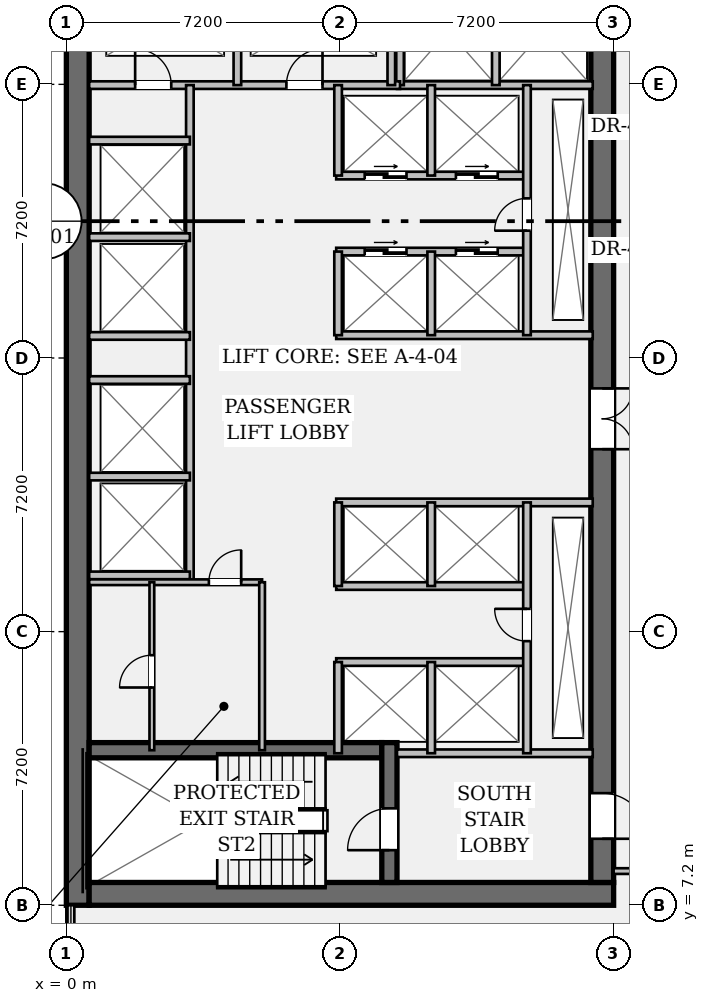
"""IFC4 building model, lengths in metres.
Left out: names, types, materials, properties, quantities, classifications, styles, units other than length and angle.
Written with IfcOpenShell. Run it as: python <this file> out.ifc"""

import sys

from ifc_helpers import new_model, si_unit, direction, frame, frame_2d, origin, place, context, subcontext, project, spatial, rectangle, extrude, element, fill, save


model = new_model("IFC4")
c1 = context("Model", 3, precision=1e-05, world=origin(), true_north=direction((0.0, 1.0)))
c2 = subcontext(c1, "Body", "Model", "MODEL_VIEW")
j1 = project(units=[si_unit("LENGTHUNIT", "METRE"), si_unit("PLANEANGLEUNIT", "RADIAN")], contexts=[c1])
p1 = place(None, origin())
s1 = spatial("IfcSite", under=j1, at=p1, CompositionType="ELEMENT")
p2 = place(p1, origin())
s2 = spatial("IfcBuilding", under=s1, at=p2, CompositionType="ELEMENT")
p3 = place(p2, frame((0.0, 0.0, 35.0)))
s3 = spatial("IfcBuildingStorey", under=s2, at=p3, CompositionType="ELEMENT", Elevation=35.0)
p4 = place(p3, frame((0.3, 7.2, 0.0), z_axis=(0.0, 0.0, 1.0), x_axis=(0.0, 1.0, 0.0)))
e1 = element("IfcWall", 1, at=p4, inside=s3, PredefinedType="SHEAR", context=c2, shape_type="SweptSolid", body=[
    extrude(rectangle(XDim=28.8, YDim=0.6, at=frame_2d((14.4, 0.0))), origin(), (0.0, 0.0, 1.0), 3.57),
])
p5 = place(p3, frame((0.6, 7.5, 0.0), z_axis=(0.0, 0.0, 1.0), x_axis=(1.0, 0.0, 0.0)))
e2 = element("IfcWall", 2, at=p5, inside=s3, PredefinedType="SHEAR", context=c2, shape_type="SweptSolid", body=[
    extrude(rectangle(XDim=13.8, YDim=0.6, at=frame_2d((6.9, 0.0))), origin(), (0.0, 0.0, 1.0), 3.57),
])
p6 = place(p3, frame((14.1, 35.4, 0.0), z_axis=(0.0, 0.0, 1.0), x_axis=(0.0, -1.0, 0.0)))
e3 = element("IfcWall", 3, at=p6, inside=s3, PredefinedType="SHEAR", context=c2, shape_type="SweptSolid", body=[
    extrude(rectangle(XDim=27.6, YDim=0.6, at=frame_2d((13.8, 0.0))), origin(), (0.0, 0.0, 1.0), 3.57),
])
p7 = place(p6, frame((1.3, 0.0, 0.0)))
e4 = element("IfcOpeningElement", 4, at=p7, cuts=e3, PredefinedType="OPENING", context=c2, shape_type="SweptSolid", body=[
    extrude(rectangle(XDim=1.2, YDim=2.15, at=frame_2d((0.6, 1.075))), frame((0.0, 0.312, 0.0), z_axis=(0.0, -1.0, 0.0), x_axis=(1.0, 0.0, 0.0)), (0.0, 0.0, 1.0), 0.624),
])
p8 = place(p6, frame((25.25, 0.0, 0.0)))
e5 = element("IfcOpeningElement", 5, at=p8, cuts=e3, PredefinedType="OPENING", context=c2, shape_type="SweptSolid", body=[
    extrude(rectangle(XDim=1.2, YDim=2.15, at=frame_2d((0.6, 1.075))), frame((0.0, 0.312, 0.0), z_axis=(0.0, -1.0, 0.0), x_axis=(1.0, 0.0, 0.0)), (0.0, 0.0, 1.0), 0.624),
])
p9 = place(p6, frame((14.6, 0.0, 0.0)))
e6 = element("IfcOpeningElement", 6, at=p9, cuts=e3, PredefinedType="OPENING", context=c2, shape_type="SweptSolid", body=[
    extrude(rectangle(XDim=1.6, YDim=2.2, at=frame_2d((0.8, 1.1))), frame((0.0, 0.312, 0.0), z_axis=(0.0, -1.0, 0.0), x_axis=(1.0, 0.0, 0.0)), (0.0, 0.0, 1.0), 0.624),
])
p10 = place(p3, frame((0.6, 11.28, 0.0), z_axis=(0.0, 0.0, 1.0), x_axis=(1.0, 0.0, 0.0)))
e7 = element("IfcWall", 7, at=p10, inside=s3, PredefinedType="SHEAR", context=c2, shape_type="SweptSolid", body=[
    extrude(rectangle(XDim=7.7, YDim=0.4, at=frame_2d((3.85, 0.0))), origin(), (0.0, 0.0, 1.0), 3.57),
])
p11 = place(p3, frame((8.5, 7.8, 0.0), z_axis=(0.0, 0.0, 1.0), x_axis=(0.0, 1.0, 0.0)))
e8 = element("IfcWall", 8, at=p11, inside=s3, PredefinedType="SHEAR", context=c2, shape_type="SweptSolid", body=[
    extrude(rectangle(XDim=3.68, YDim=0.4, at=frame_2d((1.84, 0.0))), origin(), (0.0, 0.0, 1.0), 3.57),
])
p12 = place(p11, frame((0.85, 0.0, 0.0)))
e9 = element("IfcOpeningElement", 9, at=p12, cuts=e8, PredefinedType="OPENING", context=c2, shape_type="SweptSolid", body=[
    extrude(rectangle(XDim=1.1, YDim=2.15, at=frame_2d((0.55, 1.075))), frame((0.0, 0.212, 0.0), z_axis=(0.0, -1.0, 0.0), x_axis=(1.0, 0.0, 0.0)), (0.0, 0.0, 1.0), 0.424),
])
for number, where, z_axis, x_axis in (
    (10, (8.7, 11.2, 0.0), (0.0, 0.0, 1.0), (1.0, 0.0, 0.0)),
    (11, (8.7, 28.78, 0.0), (0.0, 0.0, 1.0), (1.0, 0.0, 0.0)),
):
    element("IfcWall", number, at=place(p3, frame(where, z_axis=z_axis, x_axis=x_axis)), inside=s3, PredefinedType="PARTITIONING", context=c2, shape_type="SweptSolid", body=[
        extrude(rectangle(XDim=5.15, YDim=0.2, at=frame_2d((2.575, 0.0))), origin(), (0.0, 0.0, 1.0), 3.57),
    ])
for number, where, z_axis, x_axis in (
    (12, (8.78, 28.78, 0.0), (0.0, 0.0, 1.0), (0.0, 1.0, 0.0)),
    (13, (11.3, 28.78, 0.0), (0.0, 0.0, 1.0), (0.0, 1.0, 0.0)),
):
    element("IfcWall", number, at=place(p3, frame(where, z_axis=z_axis, x_axis=x_axis)), inside=s3, PredefinedType="PARTITIONING", context=c2, shape_type="SweptSolid", body=[
        extrude(rectangle(XDim=3.1, YDim=0.2, at=frame_2d((1.55, 0.0))), origin(), (0.0, 0.0, 1.0), 3.57),
    ])
p13 = place(p3, frame((0.6, 28.78, 0.0), z_axis=(0.0, 0.0, 1.0), x_axis=(1.0, 0.0, 0.0)))
e14 = element("IfcWall", 14, at=p13, inside=s3, PredefinedType="PARTITIONING", context=c2, shape_type="SweptSolid", body=[
    extrude(rectangle(XDim=8.18, YDim=0.2, at=frame_2d((4.09, 0.0))), origin(), (0.0, 0.0, 1.0), 3.57),
])
p14 = place(p13, frame((1.21, 0.0, 0.0)))
e15 = element("IfcOpeningElement", 15, at=p14, cuts=e14, PredefinedType="OPENING", context=c2, shape_type="SweptSolid", body=[
    extrude(rectangle(XDim=0.95, YDim=2.15, at=frame_2d((0.475, 1.075))), frame((0.0, 0.112, 0.0), z_axis=(0.0, -1.0, 0.0), x_axis=(1.0, 0.0, 0.0)), (0.0, 0.0, 1.0), 0.224),
])
p15 = place(p13, frame((5.19, 0.0, 0.0)))
e16 = element("IfcOpeningElement", 16, at=p15, cuts=e14, PredefinedType="OPENING", context=c2, shape_type="SweptSolid", body=[
    extrude(rectangle(XDim=0.95, YDim=2.15, at=frame_2d((0.475, 1.075))), frame((0.0, 0.112, 0.0), z_axis=(0.0, -1.0, 0.0), x_axis=(1.0, 0.0, 0.0)), (0.0, 0.0, 1.0), 0.224),
])
for number, where, z_axis, x_axis in (
    (17, (4.5, 28.78, 0.0), (0.0, 0.0, 1.0), (0.0, 1.0, 0.0)),
    (18, (8.55, 28.78, 0.0), (0.0, 0.0, 1.0), (0.0, 1.0, 0.0)),
):
    element("IfcWall", number, at=place(p3, frame(where, z_axis=z_axis, x_axis=x_axis)), inside=s3, PredefinedType="PARTITIONING", context=c2, shape_type="SweptSolid", body=[
        extrude(rectangle(XDim=2.94, YDim=0.2, at=frame_2d((1.47, 0.0))), origin(), (0.0, 0.0, 1.0), 3.57),
    ])
p16 = place(p3, frame((3.25, 15.7, 0.0), z_axis=(0.0, 0.0, 1.0), x_axis=(0.0, 1.0, 0.0)))
e19 = element("IfcWall", 19, at=p16, inside=s3, PredefinedType="PARTITIONING", context=c2, shape_type="SweptSolid", body=[
    extrude(rectangle(XDim=13.08, YDim=0.2, at=frame_2d((6.54, 0.0))), origin(), (0.0, 0.0, 1.0), 3.57),
])
for number, where, z_axis, x_axis in (
    (20, (0.6, 15.88, 0.0), (0.0, 0.0, 1.0), (1.0, 0.0, 0.0)),
    (21, (0.6, 18.48, 0.0), (0.0, 0.0, 1.0), (1.0, 0.0, 0.0)),
    (22, (0.6, 22.18, 0.0), (0.0, 0.0, 1.0), (1.0, 0.0, 0.0)),
    (23, (0.6, 24.78, 0.0), (0.0, 0.0, 1.0), (1.0, 0.0, 0.0)),
    (24, (0.6, 21.02, 0.0), (0.0, 0.0, 1.0), (1.0, 0.0, 0.0)),
    (25, (0.6, 27.32, 0.0), (0.0, 0.0, 1.0), (1.0, 0.0, 0.0)),
):
    element("IfcWall", number, at=place(p3, frame(where, z_axis=z_axis, x_axis=x_axis)), inside=s3, PredefinedType="PARTITIONING", context=c2, shape_type="SweptSolid", body=[
        extrude(rectangle(XDim=2.65, YDim=0.2, at=frame_2d((1.325, 0.0))), origin(), (0.0, 0.0, 1.0), 3.57),
    ])
p17 = place(p3, frame((7.1, 22.2, 0.0), z_axis=(0.0, 0.0, 1.0), x_axis=(1.0, 0.0, 0.0)))
e26 = element("IfcWall", 26, at=p17, inside=s3, PredefinedType="PARTITIONING", context=c2, shape_type="SweptSolid", body=[
    extrude(rectangle(XDim=6.75, YDim=0.2, at=frame_2d((3.375, 0.0))), origin(), (0.0, 0.0, 1.0), 3.57),
])
p18 = place(p3, frame((7.1, 24.4, 0.0), z_axis=(0.0, 0.0, 1.0), x_axis=(1.0, 0.0, 0.0)))
e27 = element("IfcWall", 27, at=p18, inside=s3, PredefinedType="PARTITIONING", context=c2, shape_type="SweptSolid", body=[
    extrude(rectangle(XDim=5.02, YDim=0.2, at=frame_2d((2.51, 0.0))), origin(), (0.0, 0.0, 1.0), 3.57),
])
p19 = place(p18, frame((0.75, 0.0, 0.0)))
e28 = element("IfcOpeningElement", 28, at=p19, cuts=e27, PredefinedType="OPENING", context=c2, shape_type="SweptSolid", body=[
    extrude(rectangle(XDim=1.1, YDim=2.2, at=frame_2d((0.55, 1.1))), frame((0.0, 0.112, 0.0), z_axis=(0.0, -1.0, 0.0), x_axis=(1.0, 0.0, 0.0)), (0.0, 0.0, 1.0), 0.224),
])
p20 = place(p18, frame((3.15, 0.0, 0.0)))
e29 = element("IfcOpeningElement", 29, at=p20, cuts=e27, PredefinedType="OPENING", context=c2, shape_type="SweptSolid", body=[
    extrude(rectangle(XDim=1.1, YDim=2.2, at=frame_2d((0.55, 1.1))), frame((0.0, 0.112, 0.0), z_axis=(0.0, -1.0, 0.0), x_axis=(1.0, 0.0, 0.0)), (0.0, 0.0, 1.0), 0.224),
])
p21 = place(p3, frame((7.1, 26.4, 0.0), z_axis=(0.0, 0.0, 1.0), x_axis=(1.0, 0.0, 0.0)))
e30 = element("IfcWall", 30, at=p21, inside=s3, PredefinedType="PARTITIONING", context=c2, shape_type="SweptSolid", body=[
    extrude(rectangle(XDim=5.02, YDim=0.2, at=frame_2d((2.51, 0.0))), origin(), (0.0, 0.0, 1.0), 3.57),
])
p22 = place(p21, frame((0.75, 0.0, 0.0)))
e31 = element("IfcOpeningElement", 31, at=p22, cuts=e30, PredefinedType="OPENING", context=c2, shape_type="SweptSolid", body=[
    extrude(rectangle(XDim=1.1, YDim=2.2, at=frame_2d((0.55, 1.1))), frame((0.0, 0.112, 0.0), z_axis=(0.0, -1.0, 0.0), x_axis=(1.0, 0.0, 0.0)), (0.0, 0.0, 1.0), 0.224),
])
p23 = place(p21, frame((3.15, 0.0, 0.0)))
e32 = element("IfcOpeningElement", 32, at=p23, cuts=e30, PredefinedType="OPENING", context=c2, shape_type="SweptSolid", body=[
    extrude(rectangle(XDim=1.1, YDim=2.2, at=frame_2d((0.55, 1.1))), frame((0.0, 0.112, 0.0), z_axis=(0.0, -1.0, 0.0), x_axis=(1.0, 0.0, 0.0)), (0.0, 0.0, 1.0), 0.224),
])
p24 = place(p3, frame((7.15, 22.2, 0.0), z_axis=(0.0, 0.0, 1.0), x_axis=(0.0, 1.0, 0.0)))
e33 = element("IfcWall", 33, at=p24, inside=s3, PredefinedType="PARTITIONING", context=c2, shape_type="SweptSolid", body=[
    extrude(rectangle(XDim=2.2, YDim=0.2, at=frame_2d((1.1, 0.0))), origin(), (0.0, 0.0, 1.0), 3.57),
])
p25 = place(p3, frame((7.15, 26.4, 0.0), z_axis=(0.0, 0.0, 1.0), x_axis=(0.0, 1.0, 0.0)))
e34 = element("IfcWall", 34, at=p25, inside=s3, PredefinedType="PARTITIONING", context=c2, shape_type="SweptSolid", body=[
    extrude(rectangle(XDim=2.38, YDim=0.2, at=frame_2d((1.19, 0.0))), origin(), (0.0, 0.0, 1.0), 3.57),
])
p26 = place(p3, frame((9.6, 22.2, 0.0), z_axis=(0.0, 0.0, 1.0), x_axis=(0.0, 1.0, 0.0)))
e35 = element("IfcWall", 35, at=p26, inside=s3, PredefinedType="PARTITIONING", context=c2, shape_type="SweptSolid", body=[
    extrude(rectangle(XDim=2.2, YDim=0.2, at=frame_2d((1.1, 0.0))), origin(), (0.0, 0.0, 1.0), 3.57),
])
p27 = place(p3, frame((9.6, 26.4, 0.0), z_axis=(0.0, 0.0, 1.0), x_axis=(0.0, 1.0, 0.0)))
e36 = element("IfcWall", 36, at=p27, inside=s3, PredefinedType="PARTITIONING", context=c2, shape_type="SweptSolid", body=[
    extrude(rectangle(XDim=2.38, YDim=0.2, at=frame_2d((1.19, 0.0))), origin(), (0.0, 0.0, 1.0), 3.57),
])
p28 = place(p3, frame((12.12, 22.2, 0.0), z_axis=(0.0, 0.0, 1.0), x_axis=(0.0, 1.0, 0.0)))
e37 = element("IfcWall", 37, at=p28, inside=s3, PredefinedType="PARTITIONING", context=c2, shape_type="SweptSolid", body=[
    extrude(rectangle(XDim=6.58, YDim=0.2, at=frame_2d((3.29, 0.0))), origin(), (0.0, 0.0, 1.0), 3.57),
])
p29 = place(p28, frame((2.75, 0.0, 0.0)))
e38 = element("IfcOpeningElement", 38, at=p29, cuts=e37, PredefinedType="OPENING", context=c2, shape_type="SweptSolid", body=[
    extrude(rectangle(XDim=0.85, YDim=2.15, at=frame_2d((0.425, 1.075))), frame((0.0, 0.112, 0.0), z_axis=(0.0, -1.0, 0.0), x_axis=(1.0, 0.0, 0.0)), (0.0, 0.0, 1.0), 0.224),
])
p30 = place(p3, frame((7.1, 17.8, 0.0), z_axis=(0.0, 0.0, 1.0), x_axis=(1.0, 0.0, 0.0)))
e39 = element("IfcWall", 39, at=p30, inside=s3, PredefinedType="PARTITIONING", context=c2, shape_type="SweptSolid", body=[
    extrude(rectangle(XDim=6.75, YDim=0.2, at=frame_2d((3.375, 0.0))), origin(), (0.0, 0.0, 1.0), 3.57),
])
for number, where, z_axis, x_axis in (
    (40, (7.1, 15.6, 0.0), (0.0, 0.0, 1.0), (1.0, 0.0, 0.0)),
    (41, (7.1, 13.6, 0.0), (0.0, 0.0, 1.0), (1.0, 0.0, 0.0)),
):
    element("IfcWall", number, at=place(p3, frame(where, z_axis=z_axis, x_axis=x_axis)), inside=s3, PredefinedType="PARTITIONING", context=c2, shape_type="SweptSolid", body=[
        extrude(rectangle(XDim=5.02, YDim=0.2, at=frame_2d((2.51, 0.0))), origin(), (0.0, 0.0, 1.0), 3.57),
    ])
p31 = place(p3, frame((7.15, 15.6, 0.0), z_axis=(0.0, 0.0, 1.0), x_axis=(0.0, 1.0, 0.0)))
e42 = element("IfcWall", 42, at=p31, inside=s3, PredefinedType="PARTITIONING", context=c2, shape_type="SweptSolid", body=[
    extrude(rectangle(XDim=2.2, YDim=0.2, at=frame_2d((1.1, 0.0))), origin(), (0.0, 0.0, 1.0), 3.57),
])
p32 = place(p3, frame((7.15, 11.2, 0.0), z_axis=(0.0, 0.0, 1.0), x_axis=(0.0, 1.0, 0.0)))
e43 = element("IfcWall", 43, at=p32, inside=s3, PredefinedType="PARTITIONING", context=c2, shape_type="SweptSolid", body=[
    extrude(rectangle(XDim=2.4, YDim=0.2, at=frame_2d((1.2, 0.0))), origin(), (0.0, 0.0, 1.0), 3.57),
])
p33 = place(p3, frame((9.6, 15.6, 0.0), z_axis=(0.0, 0.0, 1.0), x_axis=(0.0, 1.0, 0.0)))
e44 = element("IfcWall", 44, at=p33, inside=s3, PredefinedType="PARTITIONING", context=c2, shape_type="SweptSolid", body=[
    extrude(rectangle(XDim=2.2, YDim=0.2, at=frame_2d((1.1, 0.0))), origin(), (0.0, 0.0, 1.0), 3.57),
])
p34 = place(p3, frame((9.6, 11.2, 0.0), z_axis=(0.0, 0.0, 1.0), x_axis=(0.0, 1.0, 0.0)))
e45 = element("IfcWall", 45, at=p34, inside=s3, PredefinedType="PARTITIONING", context=c2, shape_type="SweptSolid", body=[
    extrude(rectangle(XDim=2.4, YDim=0.2, at=frame_2d((1.2, 0.0))), origin(), (0.0, 0.0, 1.0), 3.57),
])
p35 = place(p3, frame((12.12, 11.2, 0.0), z_axis=(0.0, 0.0, 1.0), x_axis=(0.0, 1.0, 0.0)))
e46 = element("IfcWall", 46, at=p35, inside=s3, PredefinedType="PARTITIONING", context=c2, shape_type="SweptSolid", body=[
    extrude(rectangle(XDim=6.6, YDim=0.2, at=frame_2d((3.3, 0.0))), origin(), (0.0, 0.0, 1.0), 3.57),
])
p36 = place(p35, frame((2.95, 0.0, 0.0)))
e47 = element("IfcOpeningElement", 47, at=p36, cuts=e46, PredefinedType="OPENING", context=c2, shape_type="SweptSolid", body=[
    extrude(rectangle(XDim=0.85, YDim=2.15, at=frame_2d((0.425, 1.075))), frame((0.0, 0.112, 0.0), z_axis=(0.0, -1.0, 0.0), x_axis=(1.0, 0.0, 0.0)), (0.0, 0.0, 1.0), 0.224),
])
p37 = place(p3, frame((0.6, 15.7, 0.0), z_axis=(0.0, 0.0, 1.0), x_axis=(1.0, 0.0, 0.0)))
e48 = element("IfcWall", 48, at=p37, inside=s3, PredefinedType="PARTITIONING", context=c2, shape_type="SweptSolid", body=[
    extrude(rectangle(XDim=4.55, YDim=0.15, at=frame_2d((2.275, 0.0))), origin(), (0.0, 0.0, 1.0), 3.57),
])
p38 = place(p37, frame((3.15, 0.0, 0.0)))
e49 = element("IfcOpeningElement", 49, at=p38, cuts=e48, PredefinedType="OPENING", context=c2, shape_type="SweptSolid", body=[
    extrude(rectangle(XDim=0.85, YDim=2.15, at=frame_2d((0.425, 1.075))), frame((0.0, 0.087, 0.0), z_axis=(0.0, -1.0, 0.0), x_axis=(1.0, 0.0, 0.0)), (0.0, 0.0, 1.0), 0.174),
])
p39 = place(p3, frame((5.15, 11.28, 0.0), z_axis=(0.0, 0.0, 1.0), x_axis=(0.0, 1.0, 0.0)))
e50 = element("IfcWall", 50, at=p39, inside=s3, PredefinedType="PARTITIONING", context=c2, shape_type="SweptSolid", body=[
    extrude(rectangle(XDim=4.42, YDim=0.15, at=frame_2d((2.21, 0.0))), origin(), (0.0, 0.0, 1.0), 3.57),
])
p40 = place(p3, frame((2.25, 11.28, 0.0), z_axis=(0.0, 0.0, 1.0), x_axis=(0.0, 1.0, 0.0)))
e51 = element("IfcWall", 51, at=p40, inside=s3, PredefinedType="PARTITIONING", context=c2, shape_type="SweptSolid", body=[
    extrude(rectangle(XDim=4.42, YDim=0.125, at=frame_2d((2.21, 0.0))), origin(), (0.0, 0.0, 1.0), 3.57),
])
p41 = place(p40, frame((1.65, 0.0, 0.0)))
e52 = element("IfcOpeningElement", 52, at=p41, cuts=e51, PredefinedType="OPENING", context=c2, shape_type="SweptSolid", body=[
    extrude(rectangle(XDim=0.85, YDim=2.15, at=frame_2d((0.425, 1.075))), frame((0.0, 0.074, 0.0), z_axis=(0.0, -1.0, 0.0), x_axis=(1.0, 0.0, 0.0)), (0.0, 0.0, 1.0), 0.149),
])
p42 = place(p3, frame((14.4, 8.1, 0.0), z_axis=(0.0, 0.0, 1.0), x_axis=(1.0, 0.0, 0.0)))
e53 = element("IfcWall", 53, at=p42, inside=s3, PredefinedType="PARTITIONING", context=c2, shape_type="SweptSolid", body=[
    extrude(rectangle(XDim=2.95, YDim=0.15, at=frame_2d((1.475, 0.0))), origin(), (0.0, 0.0, 1.0), 2.628),
])
p43 = place(p42, frame((0.95, 0.0, 0.0)))
e54 = element("IfcOpeningElement", 54, at=p43, cuts=e53, PredefinedType="OPENING", context=c2, shape_type="SweptSolid", body=[
    extrude(rectangle(XDim=0.95, YDim=2.15, at=frame_2d((0.475, 1.075))), frame((0.0, 0.087, 0.0), z_axis=(0.0, -1.0, 0.0), x_axis=(1.0, 0.0, 0.0)), (0.0, 0.0, 1.0), 0.174),
])
p44 = place(p12, origin())
e55 = element("IfcDoor", 55, at=p44, inside=s3, OperationType="SINGLE_SWING_LEFT", PredefinedType="DOOR", context=c2, shape_type="SweptSolid", body=[
    extrude(rectangle(XDim=1.1, YDim=2.15, at=frame_2d((0.55, 1.075))), frame((0.0, 0.025, 0.0), z_axis=(0.0, -1.0, 0.0), x_axis=(1.0, 0.0, 0.0)), (0.0, 0.0, 1.0), 0.05),
])
fill(e9, e55)
p45 = place(p8, origin())
e56 = element("IfcDoor", 56, at=p45, inside=s3, OperationType="SINGLE_SWING_RIGHT", PredefinedType="DOOR", context=c2, shape_type="SweptSolid", body=[
    extrude(rectangle(XDim=1.2, YDim=2.15, at=frame_2d((0.6, 1.075))), frame((0.0, 0.025, 0.0), z_axis=(0.0, -1.0, 0.0), x_axis=(1.0, 0.0, 0.0)), (0.0, 0.0, 1.0), 0.05),
])
fill(e5, e56)
p46 = place(p14, origin())
e57 = element("IfcDoor", 57, at=p46, inside=s3, OperationType="SINGLE_SWING_LEFT", PredefinedType="DOOR", context=c2, shape_type="SweptSolid", body=[
    extrude(rectangle(XDim=0.95, YDim=2.15, at=frame_2d((0.475, 1.075))), frame((0.0, 0.025, 0.0), z_axis=(0.0, -1.0, 0.0), x_axis=(1.0, 0.0, 0.0)), (0.0, 0.0, 1.0), 0.05),
])
fill(e15, e57)
p47 = place(p15, origin())
e58 = element("IfcDoor", 58, at=p47, inside=s3, OperationType="SINGLE_SWING_RIGHT", PredefinedType="DOOR", context=c2, shape_type="SweptSolid", body=[
    extrude(rectangle(XDim=0.95, YDim=2.15, at=frame_2d((0.475, 1.075))), frame((0.0, 0.025, 0.0), z_axis=(0.0, -1.0, 0.0), x_axis=(1.0, 0.0, 0.0)), (0.0, 0.0, 1.0), 0.05),
])
fill(e16, e58)
p48 = place(p9, origin())
e59 = element("IfcDoor", 59, at=p48, inside=s3, OperationType="DOUBLE_DOOR_SINGLE_SWING", PredefinedType="DOOR", context=c2, shape_type="SweptSolid", body=[
    extrude(rectangle(XDim=1.6, YDim=2.2, at=frame_2d((0.8, 1.1))), frame((0.0, 0.025, 0.0), z_axis=(0.0, -1.0, 0.0), x_axis=(1.0, 0.0, 0.0)), (0.0, 0.0, 1.0), 0.05),
])
fill(e6, e59)
p49 = place(p29, origin())
e60 = element("IfcDoor", 60, at=p49, inside=s3, OperationType="SINGLE_SWING_LEFT", PredefinedType="DOOR", context=c2, shape_type="SweptSolid", body=[
    extrude(rectangle(XDim=0.85, YDim=2.15, at=frame_2d((0.425, 1.075))), frame((0.0, 0.025, 0.0), z_axis=(0.0, -1.0, 0.0), x_axis=(1.0, 0.0, 0.0)), (0.0, 0.0, 1.0), 0.05),
])
fill(e38, e60)
p50 = place(p19, origin())
e61 = element("IfcDoor", 61, at=p50, inside=s3, OperationType="DOUBLE_DOOR_SLIDING", PredefinedType="DOOR", context=c2, shape_type="SweptSolid", body=[
    extrude(rectangle(XDim=1.1, YDim=2.2, at=frame_2d((0.55, 1.1))), frame((0.0, 0.025, 0.0), z_axis=(0.0, -1.0, 0.0), x_axis=(1.0, 0.0, 0.0)), (0.0, 0.0, 1.0), 0.05),
])
fill(e28, e61)
p51 = place(p20, origin())
e62 = element("IfcDoor", 62, at=p51, inside=s3, OperationType="DOUBLE_DOOR_SLIDING", PredefinedType="DOOR", context=c2, shape_type="SweptSolid", body=[
    extrude(rectangle(XDim=1.1, YDim=2.2, at=frame_2d((0.55, 1.1))), frame((0.0, 0.025, 0.0), z_axis=(0.0, -1.0, 0.0), x_axis=(1.0, 0.0, 0.0)), (0.0, 0.0, 1.0), 0.05),
])
fill(e29, e62)
p52 = place(p22, origin())
e63 = element("IfcDoor", 63, at=p52, inside=s3, OperationType="DOUBLE_DOOR_SLIDING", PredefinedType="DOOR", context=c2, shape_type="SweptSolid", body=[
    extrude(rectangle(XDim=1.1, YDim=2.2, at=frame_2d((0.55, 1.1))), frame((0.0, 0.025, 0.0), z_axis=(0.0, -1.0, 0.0), x_axis=(1.0, 0.0, 0.0)), (0.0, 0.0, 1.0), 0.05),
])
fill(e31, e63)
p53 = place(p23, origin())
e64 = element("IfcDoor", 64, at=p53, inside=s3, OperationType="DOUBLE_DOOR_SLIDING", PredefinedType="DOOR", context=c2, shape_type="SweptSolid", body=[
    extrude(rectangle(XDim=1.1, YDim=2.2, at=frame_2d((0.55, 1.1))), frame((0.0, 0.025, 0.0), z_axis=(0.0, -1.0, 0.0), x_axis=(1.0, 0.0, 0.0)), (0.0, 0.0, 1.0), 0.05),
])
fill(e32, e64)
p54 = place(p36, origin())
e65 = element("IfcDoor", 65, at=p54, inside=s3, OperationType="SINGLE_SWING_RIGHT", PredefinedType="DOOR", context=c2, shape_type="SweptSolid", body=[
    extrude(rectangle(XDim=0.85, YDim=2.15, at=frame_2d((0.425, 1.075))), frame((0.0, 0.025, 0.0), z_axis=(0.0, -1.0, 0.0), x_axis=(1.0, 0.0, 0.0)), (0.0, 0.0, 1.0), 0.05),
])
fill(e47, e65)
p55 = place(p38, origin())
e66 = element("IfcDoor", 66, at=p55, inside=s3, OperationType="SINGLE_SWING_RIGHT", PredefinedType="DOOR", context=c2, shape_type="SweptSolid", body=[
    extrude(rectangle(XDim=0.85, YDim=2.15, at=frame_2d((0.425, 1.075))), frame((0.0, 0.025, 0.0), z_axis=(0.0, -1.0, 0.0), x_axis=(1.0, 0.0, 0.0)), (0.0, 0.0, 1.0), 0.05),
])
fill(e49, e66)
p56 = place(p41, origin())
e67 = element("IfcDoor", 67, at=p56, inside=s3, OperationType="SINGLE_SWING_LEFT", PredefinedType="DOOR", context=c2, shape_type="SweptSolid", body=[
    extrude(rectangle(XDim=0.85, YDim=2.15, at=frame_2d((0.425, 1.075))), frame((0.0, 0.025, 0.0), z_axis=(0.0, -1.0, 0.0), x_axis=(1.0, 0.0, 0.0)), (0.0, 0.0, 1.0), 0.05),
])
fill(e52, e67)
save(model, sys.argv[1])
